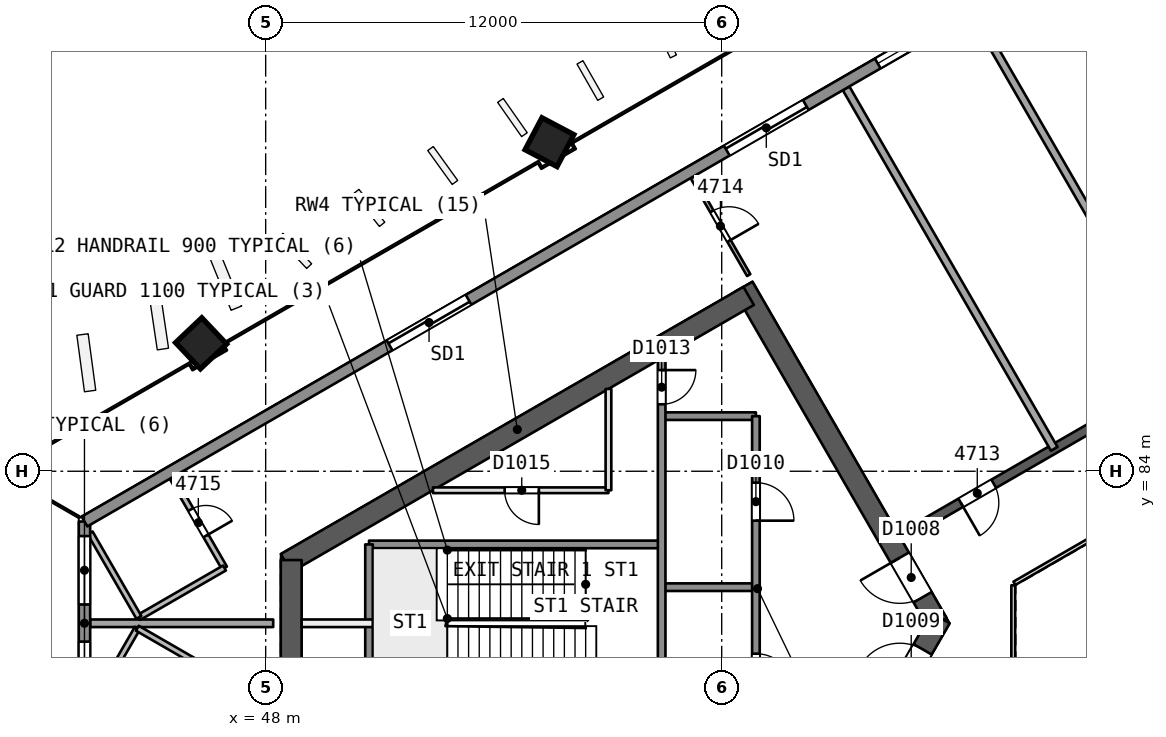
"""IFC4 building model, lengths in metres.
Left out: names, types, materials, properties, quantities, classifications, styles, units other than length and angle.
Written with IfcOpenShell. Run it as: python <this file> out.ifc"""

import sys

from ifc_helpers import new_model, si_unit, direction, frame, frame_2d, origin, origin_2d, place, context, subcontext, project, spatial, rectangle, extrude, element, fill, save


model = new_model("IFC4")
c1 = context("Model", 3, precision=1e-05, world=origin(), true_north=direction((0.0, 1.0)))
c2 = subcontext(c1, "Body", "Model", "MODEL_VIEW")
j1 = project(units=[si_unit("LENGTHUNIT", "METRE"), si_unit("PLANEANGLEUNIT", "RADIAN")], contexts=[c1])
p1 = place(None, origin())
s1 = spatial("IfcSite", under=j1, at=p1, CompositionType="ELEMENT")
p2 = place(p1, origin())
s2 = spatial("IfcBuilding", under=s1, at=p2, CompositionType="ELEMENT")
p3 = place(p2, frame((0.0, 0.0, 193.3)))
s3 = spatial("IfcBuildingStorey", under=s2, at=p3, CompositionType="ELEMENT", Elevation=193.3)
p4 = place(p3, frame((65.682, 80.0, 0.0), z_axis=(0.0, 0.0, 1.0), x_axis=(-0.500000202252, 0.866025287014, 0.0)))
e1 = element("IfcWall", 1, at=p4, inside=s3, PredefinedType="SHEAR", context=c2, shape_type="SweptSolid", body=[
    extrude(rectangle(XDim=10.221, YDim=0.55, at=frame_2d((5.111, 0.0))), origin(), (0.0, 0.0, 1.0), 3.7),
])
p5 = place(p4, frame((0.791, 0.0, 0.0)))
e2 = element("IfcOpeningElement", 2, at=p5, cuts=e1, PredefinedType="OPENING", context=c2, shape_type="SweptSolid", body=[
    extrude(rectangle(XDim=1.2, YDim=2.1, at=frame_2d((0.6, 1.05))), frame((0.0, 0.286, 0.0), z_axis=(0.0, -1.0, 0.0), x_axis=(1.0, 0.0, 0.0)), (0.0, 0.0, 1.0), 0.571),
])
p6 = place(p3, frame((60.709, 88.614, 0.0), z_axis=(0.0, 0.0, 1.0), x_axis=(-0.866020164116, -0.500009075263, 0.0)))
e3 = element("IfcWall", 3, at=p6, inside=s3, PredefinedType="SHEAR", context=c2, shape_type="SweptSolid", body=[
    extrude(rectangle(XDim=14.058, YDim=0.55, at=frame_2d((7.029, 0.0))), origin(), (0.0, 0.0, 1.0), 3.7),
])
p7 = place(p3, frame((48.672, 81.664, 0.0), z_axis=(0.0, 0.0, 1.0), x_axis=(0.0, -1.0, 0.0)))
e4 = element("IfcWall", 4, at=p7, inside=s3, PredefinedType="SHEAR", context=c2, shape_type="SweptSolid", body=[
    extrude(rectangle(XDim=3.487, YDim=0.55, at=frame_2d((1.743, 0.0))), origin(), (0.0, 0.0, 1.0), 3.7),
])
p8 = place(p3, frame((60.709, 71.386, 0.0), z_axis=(0.0, 0.0, 1.0), x_axis=(0.500015938302, 0.866016201606, 0.0)))
e5 = element("IfcWall", 5, at=p8, inside=s3, PredefinedType="SHEAR", context=c2, shape_type="SweptSolid", body=[
    extrude(rectangle(XDim=10.105, YDim=0.55, at=frame_2d((5.053, 0.0))), origin(), (0.0, 0.0, 1.0), 3.7),
])
p9 = place(p8, frame((7.955, 0.0, 0.0)))
e6 = element("IfcOpeningElement", 6, at=p9, cuts=e5, PredefinedType="OPENING", context=c2, shape_type="SweptSolid", body=[
    extrude(rectangle(XDim=1.2, YDim=2.1, at=frame_2d((0.6, 1.05))), frame((0.0, 0.286, 0.0), z_axis=(0.0, -1.0, 0.0), x_axis=(1.0, 0.0, 0.0)), (0.0, 0.0, 1.0), 0.571),
])
p10 = place(p3, frame((78.2, 90.046, 0.0), z_axis=(0.0, 0.0, 1.0), x_axis=(-0.866026492143, -0.499998114903, 0.0)))
e7 = element("IfcWall", 7, at=p10, inside=s3, PredefinedType="SHEAR", context=c2, shape_type="SweptSolid", body=[
    extrude(rectangle(XDim=15.588, YDim=0.25, at=frame_2d((7.794, 0.0))), origin(), (0.0, 0.0, 1.0), 3.3),
])
p11 = place(p10, frame((1.059, 0.0, 0.0)))
e8 = element("IfcOpeningElement", 8, at=p11, cuts=e7, PredefinedType="OPENING", context=c2, shape_type="SweptSolid", body=[
    extrude(rectangle(XDim=1.0, YDim=2.1, at=frame_2d((0.5, 1.05))), frame((0.0, 0.135, 0.0), z_axis=(0.0, -1.0, 0.0), x_axis=(1.0, 0.0, 0.0)), (0.0, 0.0, 1.0), 0.271),
])
p12 = place(p10, frame((4.616, 0.0, 0.0)))
e9 = element("IfcOpeningElement", 9, at=p12, cuts=e7, PredefinedType="OPENING", context=c2, shape_type="SweptSolid", body=[
    extrude(rectangle(XDim=0.9, YDim=2.1, at=frame_2d((0.45, 1.05))), frame((0.0, 0.135, 0.0), z_axis=(0.0, -1.0, 0.0), x_axis=(1.0, 0.0, 0.0)), (0.0, 0.0, 1.0), 0.271),
])
p13 = place(p10, frame((8.513, 0.0, 0.0)))
e10 = element("IfcOpeningElement", 10, at=p13, cuts=e7, PredefinedType="OPENING", context=c2, shape_type="SweptSolid", body=[
    extrude(rectangle(XDim=0.9, YDim=2.1, at=frame_2d((0.45, 1.05))), frame((0.0, 0.135, 0.0), z_axis=(0.0, -1.0, 0.0), x_axis=(1.0, 0.0, 0.0)), (0.0, 0.0, 1.0), 0.271),
])
p14 = place(p10, frame((12.75, 0.0, 0.0)))
e11 = element("IfcOpeningElement", 11, at=p14, cuts=e7, PredefinedType="OPENING", context=c2, shape_type="SweptSolid", body=[
    extrude(rectangle(XDim=1.0, YDim=2.1, at=frame_2d((0.5, 1.05))), frame((0.0, 0.135, 0.0), z_axis=(0.0, -1.0, 0.0), x_axis=(1.0, 0.0, 0.0)), (0.0, 0.0, 1.0), 0.271),
])
p15 = place(p3, frame((55.445, 92.674, 0.0), z_axis=(0.019328501455, -0.012204002625, 0.999738701537), x_axis=(-0.498096589224, 0.866885952098, 0.020212220507)))
e12 = element("IfcColumn", 12, at=p15, inside=s3, PredefinedType="COLUMN", context=c2, shape_type="SweptSolid", body=[
    extrude(rectangle(XDim=0.95, YDim=0.95, at=origin_2d()), origin(), (0.0, 0.0, 1.0), 3.701),
])
p16 = place(p3, frame((46.266, 87.374, 0.0), z_axis=(0.02855911485, -0.006793507689, 0.999569019734), x_axis=(-0.500407643461, 0.865554709988, 0.020180049142)))
e13 = element("IfcColumn", 13, at=p16, inside=s3, PredefinedType="COLUMN", context=c2, shape_type="SweptSolid", body=[
    extrude(rectangle(XDim=0.95, YDim=0.95, at=origin_2d()), origin(), (0.0, 0.0, 1.0), 3.702),
])
for number, where, z_axis, x_axis in (
    (14, (66.648, 96.025, 0.0), (0.0, 0.0, 1.0), (0.5, -0.866, 0.0)),
    (15, (63.273, 94.076, 0.0), (0.0, 0.0, 1.0), (0.5, -0.866, 0.0)),
):
    element("IfcWall", number, at=place(p3, frame(where, z_axis=z_axis, x_axis=x_axis)), inside=s3, PredefinedType="PARTITIONING", context=c2, shape_type="SweptSolid", body=[
        extrude(rectangle(XDim=10.954, YDim=0.2, at=frame_2d((5.477, 0.0))), origin(), (0.0, 0.0, 1.0), 3.3),
    ])
p17 = place(p3, frame((59.223, 91.738, 0.0), z_axis=(0.0, 0.0, 1.0), x_axis=(0.49997816789, -0.866038008192, 0.0)))
e16 = element("IfcWall", 16, at=p17, inside=s3, PredefinedType="PARTITIONING", context=c2, shape_type="SweptSolid", body=[
    extrude(rectangle(XDim=2.975, YDim=0.1, at=frame_2d((1.488, 0.0))), origin(), (0.0, 0.0, 1.0), 3.3),
])
p18 = place(p17, frame((1.038, 0.0, 0.0)))
e17 = element("IfcOpeningElement", 17, at=p18, cuts=e16, PredefinedType="OPENING", context=c2, shape_type="SweptSolid", body=[
    extrude(rectangle(XDim=0.9, YDim=2.1, at=frame_2d((0.45, 1.05))), frame((0.0, 0.061, 0.0), z_axis=(0.0, -1.0, 0.0), x_axis=(1.0, 0.0, 0.0)), (0.0, 0.0, 1.0), 0.121),
])
p19 = place(p3, frame((45.54, 83.838, 0.0), z_axis=(0.0, 0.0, 1.0), x_axis=(0.499983500429, -0.866034929606, 0.0)))
e18 = element("IfcWall", 18, at=p19, inside=s3, PredefinedType="PARTITIONING", context=c2, shape_type="SweptSolid", body=[
    extrude(rectangle(XDim=2.752, YDim=0.15, at=frame_2d((1.376, 0.0))), origin(), (0.0, 0.0, 1.0), 3.3),
])
p20 = place(p19, frame((0.976, 0.0, 0.0)))
e19 = element("IfcOpeningElement", 19, at=p20, cuts=e18, PredefinedType="OPENING", context=c2, shape_type="SweptSolid", body=[
    extrude(rectangle(XDim=0.8, YDim=2.1, at=frame_2d((0.4, 1.05))), frame((0.0, 0.085, 0.0), z_axis=(0.0, -1.0, 0.0), x_axis=(1.0, 0.0, 0.0)), (0.0, 0.0, 1.0), 0.171),
])
p21 = place(p3, frame((46.916, 81.454, 0.0), z_axis=(0.0, 0.0, 1.0), x_axis=(-0.866021400173, -0.500006934395, 0.0)))
e20 = element("IfcWall", 20, at=p21, inside=s3, PredefinedType="PARTITIONING", context=c2, shape_type="SweptSolid", body=[
    extrude(rectangle(XDim=2.6, YDim=0.15, at=frame_2d((1.3, 0.0))), origin(), (0.0, 0.0, 1.0), 3.3),
])
p22 = place(p3, frame((44.664, 80.154, 0.0), z_axis=(0.0, 0.0, 1.0), x_axis=(-0.49996389635, 0.866046247233, 0.0)))
e21 = element("IfcWall", 21, at=p22, inside=s3, PredefinedType="PARTITIONING", context=c2, shape_type="SweptSolid", body=[
    extrude(rectangle(XDim=2.568, YDim=0.15, at=frame_2d((1.284, 0.0))), origin(), (0.0, 0.0, 1.0), 3.3),
])
p23 = place(p3, frame((43.381, 80.0, 0.0), z_axis=(0.0, 0.0, 1.0), x_axis=(1.0, 0.0, 0.0)))
e22 = element("IfcWall", 22, at=p23, inside=s3, PredefinedType="PARTITIONING", context=c2, shape_type="SweptSolid", body=[
    extrude(rectangle(XDim=4.817, YDim=0.2, at=frame_2d((2.409, 0.0))), origin(), (0.0, 0.0, 1.0), 3.3),
])
p24 = place(p3, frame((43.381, 77.718, 0.0), z_axis=(0.0, 0.0, 1.0), x_axis=(0.499943602543, 0.866057962423, 0.0)))
e23 = element("IfcWall", 23, at=p24, inside=s3, PredefinedType="PARTITIONING", context=c2, shape_type="SweptSolid", body=[
    extrude(rectangle(XDim=2.485, YDim=0.15, at=frame_2d((1.242, 0.0))), origin(), (0.0, 0.0, 1.0), 3.3),
])
p25 = place(p3, frame((44.623, 79.87, 0.0), z_axis=(0.0, 0.0, 1.0), x_axis=(0.866021400173, -0.500006934395, 0.0)))
e24 = element("IfcWall", 24, at=p25, inside=s3, PredefinedType="PARTITIONING", context=c2, shape_type="SweptSolid", body=[
    extrude(rectangle(XDim=2.6, YDim=0.15, at=frame_2d((1.3, 0.0))), origin(), (0.0, 0.0, 1.0), 3.3),
])
p26 = place(p3, frame((43.232, 77.322, 0.0), z_axis=(0.0, 0.0, 1.0), x_axis=(0.0, 1.0, 0.0)))
e25 = element("IfcWall", 25, at=p26, inside=s3, PredefinedType="SOLIDWALL", context=c2, shape_type="SweptSolid", body=[
    extrude(rectangle(XDim=5.355, YDim=0.3, at=frame_2d((2.678, 0.0))), origin(), (0.0, 0.0, 1.0), 3.3),
])
p27 = place(p26, frame((3.172, 0.0, 0.9)))
e26 = element("IfcOpeningElement", 26, at=p27, cuts=e25, PredefinedType="OPENING", context=c2, shape_type="SweptSolid", body=[
    extrude(rectangle(XDim=1.8, YDim=1.5, at=frame_2d((0.9, 0.75))), frame((0.0, 0.161, 0.0), z_axis=(0.0, -1.0, 0.0), x_axis=(1.0, 0.0, 0.0)), (0.0, 0.0, 1.0), 0.321),
])
p28 = place(p26, frame((0.395, 0.0, 0.9)))
e27 = element("IfcOpeningElement", 27, at=p28, cuts=e25, PredefinedType="OPENING", context=c2, shape_type="SweptSolid", body=[
    extrude(rectangle(XDim=1.8, YDim=1.5, at=frame_2d((0.9, 0.75))), frame((0.0, 0.161, 0.0), z_axis=(0.0, -1.0, 0.0), x_axis=(1.0, 0.0, 0.0)), (0.0, 0.0, 1.0), 0.321),
])
p29 = place(p3, frame((43.232, 82.678, 0.0), z_axis=(0.0, 0.0, 1.0), x_axis=(0.866025125259, 0.500000482419, 0.0)))
e28 = element("IfcWall", 28, at=p29, inside=s3, PredefinedType="SOLIDWALL", context=c2, shape_type="SweptSolid", body=[
    extrude(rectangle(XDim=52.347, YDim=0.3, at=frame_2d((26.173, 0.0))), origin(), (0.0, 0.0, 1.0), 3.3),
])
p30 = place(p29, frame((31.209, 0.0, 0.0)))
e29 = element("IfcOpeningElement", 29, at=p30, cuts=e28, PredefinedType="OPENING", context=c2, shape_type="SweptSolid", body=[
    extrude(rectangle(XDim=2.4, YDim=2.4, at=frame_2d((1.2, 1.2))), frame((0.0, 0.161, 0.0), z_axis=(0.0, -1.0, 0.0), x_axis=(1.0, 0.0, 0.0)), (0.0, 0.0, 1.0), 0.321),
])
p31 = place(p29, frame((40.7, 0.0, 0.0)))
e30 = element("IfcOpeningElement", 30, at=p31, cuts=e28, PredefinedType="OPENING", context=c2, shape_type="SweptSolid", body=[
    extrude(rectangle(XDim=2.4, YDim=2.4, at=frame_2d((1.2, 1.2))), frame((0.0, 0.161, 0.0), z_axis=(0.0, -1.0, 0.0), x_axis=(1.0, 0.0, 0.0)), (0.0, 0.0, 1.0), 0.321),
])
p32 = place(p29, frame((19.517, 0.0, 0.0)))
e31 = element("IfcOpeningElement", 31, at=p32, cuts=e28, PredefinedType="OPENING", context=c2, shape_type="SweptSolid", body=[
    extrude(rectangle(XDim=2.4, YDim=2.4, at=frame_2d((1.2, 1.2))), frame((0.0, 0.161, 0.0), z_axis=(0.0, -1.0, 0.0), x_axis=(1.0, 0.0, 0.0)), (0.0, 0.0, 1.0), 0.321),
])
p33 = place(p29, frame((9.27, 0.0, 0.0)))
e32 = element("IfcOpeningElement", 32, at=p33, cuts=e28, PredefinedType="OPENING", context=c2, shape_type="SweptSolid", body=[
    extrude(rectangle(XDim=2.4, YDim=2.4, at=frame_2d((1.2, 1.2))), frame((0.0, 0.161, 0.0), z_axis=(0.0, -1.0, 0.0), x_axis=(1.0, 0.0, 0.0)), (0.0, 0.0, 1.0), 0.321),
])
p34 = place(p29, frame((28.001, 0.0, 0.9)))
e33 = element("IfcOpeningElement", 33, at=p34, cuts=e28, PredefinedType="OPENING", context=c2, shape_type="SweptSolid", body=[
    extrude(rectangle(XDim=1.8, YDim=1.5, at=frame_2d((0.9, 0.75))), frame((0.0, 0.161, 0.0), z_axis=(0.0, -1.0, 0.0), x_axis=(1.0, 0.0, 0.0)), (0.0, 0.0, 1.0), 0.321),
])
p35 = place(p29, frame((24.104, 0.0, 0.9)))
e34 = element("IfcOpeningElement", 34, at=p35, cuts=e28, PredefinedType="OPENING", context=c2, shape_type="SweptSolid", body=[
    extrude(rectangle(XDim=1.8, YDim=1.5, at=frame_2d((0.9, 0.75))), frame((0.0, 0.161, 0.0), z_axis=(0.0, -1.0, 0.0), x_axis=(1.0, 0.0, 0.0)), (0.0, 0.0, 1.0), 0.321),
])
p36 = place(p3, frame((60.9, 85.45, 0.0), z_axis=(0.0, 0.0, 1.0), x_axis=(-1.0, 0.0, 0.0)))
e35 = element("IfcWall", 35, at=p36, inside=s3, PredefinedType="SOLIDWALL", context=c2, shape_type="SweptSolid", body=[
    extrude(rectangle(XDim=2.48, YDim=0.2, at=frame_2d((1.24, 0.0))), origin(), (0.0, 0.0, 1.0), 3.3),
])
p37 = place(p3, frame((57.02, 83.5, 0.0), z_axis=(0.0, 0.0, 1.0), x_axis=(-1.0, 0.0, 0.0)))
e36 = element("IfcWall", 36, at=p37, inside=s3, PredefinedType="PARTITIONING", context=c2, shape_type="SweptSolid", body=[
    extrude(rectangle(XDim=4.618, YDim=0.15, at=frame_2d((2.309, 0.0))), origin(), (0.0, 0.0, 1.0), 3.3),
])
p38 = place(p37, frame((1.832, 0.0, 0.0)))
e37 = element("IfcOpeningElement", 37, at=p38, cuts=e36, PredefinedType="OPENING", context=c2, shape_type="SweptSolid", body=[
    extrude(rectangle(XDim=0.9, YDim=2.1, at=frame_2d((0.45, 1.05))), frame((0.0, 0.085, 0.0), z_axis=(0.0, -1.0, 0.0), x_axis=(1.0, 0.0, 0.0)), (0.0, 0.0, 1.0), 0.171),
])
p39 = place(p3, frame((58.42, 82.075, 0.0), z_axis=(0.0, 0.0, 1.0), x_axis=(-1.0, 0.0, 0.0)))
e38 = element("IfcWall", 38, at=p39, inside=s3, PredefinedType="SOLIDWALL", context=c2, shape_type="SweptSolid", body=[
    extrude(rectangle(XDim=7.7, YDim=0.2, at=frame_2d((3.85, 0.0))), origin(), (0.0, 0.0, 1.0), 3.3),
])
p40 = place(p3, frame((60.9, 80.95, 0.0), z_axis=(0.0, 0.0, 1.0), x_axis=(-1.0, 0.0, 0.0)))
e39 = element("IfcWall", 39, at=p40, inside=s3, PredefinedType="SOLIDWALL", context=c2, shape_type="SweptSolid", body=[
    extrude(rectangle(XDim=2.48, YDim=0.2, at=frame_2d((1.24, 0.0))), origin(), (0.0, 0.0, 1.0), 3.3),
])
p41 = place(p3, frame((50.82, 80.0, 0.0), z_axis=(0.0, 0.0, 1.0), x_axis=(-1.0, 0.0, 0.0)))
e40 = element("IfcWall", 40, at=p41, inside=s3, PredefinedType="PARTITIONING", context=c2, shape_type="SweptSolid", body=[
    extrude(rectangle(XDim=1.873, YDim=0.2, at=frame_2d((0.937, 0.0))), origin(), (0.0, 0.0, 1.0), 3.3),
])
p42 = place(p3, frame((60.9, 85.45, 0.0), z_axis=(0.0, 0.0, 1.0), x_axis=(0.0, -1.0, 0.0)))
e41 = element("IfcWall", 41, at=p42, inside=s3, PredefinedType="SOLIDWALL", context=c2, shape_type="SweptSolid", body=[
    extrude(rectangle(XDim=10.9, YDim=0.2, at=frame_2d((5.45, 0.0))), origin(), (0.0, 0.0, 1.0), 3.3),
])
p43 = place(p42, frame((1.75, 0.0, 0.0)))
e42 = element("IfcOpeningElement", 42, at=p43, cuts=e41, PredefinedType="OPENING", context=c2, shape_type="SweptSolid", body=[
    extrude(rectangle(XDim=1.0, YDim=2.1, at=frame_2d((0.5, 1.05))), frame((0.0, 0.11, 0.0), z_axis=(0.0, -1.0, 0.0), x_axis=(1.0, 0.0, 0.0)), (0.0, 0.0, 1.0), 0.221),
])
p44 = place(p42, frame((6.25, 0.0, 0.0)))
e43 = element("IfcOpeningElement", 43, at=p44, cuts=e41, PredefinedType="OPENING", context=c2, shape_type="SweptSolid", body=[
    extrude(rectangle(XDim=1.0, YDim=2.1, at=frame_2d((0.5, 1.05))), frame((0.0, 0.11, 0.0), z_axis=(0.0, -1.0, 0.0), x_axis=(1.0, 0.0, 0.0)), (0.0, 0.0, 1.0), 0.221),
])
p45 = place(p3, frame((58.42, 86.974, 0.0), z_axis=(0.0, 0.0, 1.0), x_axis=(0.0, -1.0, 0.0)))
e44 = element("IfcWall", 44, at=p45, inside=s3, PredefinedType="SOLIDWALL", context=c2, shape_type="SweptSolid", body=[
    extrude(rectangle(XDim=10.524, YDim=0.2, at=frame_2d((5.262, 0.0))), origin(), (0.0, 0.0, 1.0), 3.3),
])
p46 = place(p45, frame((0.312, 0.0, 0.0)))
e45 = element("IfcOpeningElement", 45, at=p46, cuts=e44, PredefinedType="OPENING", context=c2, shape_type="SweptSolid", body=[
    extrude(rectangle(XDim=0.9, YDim=2.1, at=frame_2d((0.45, 1.05))), frame((0.0, 0.11, 0.0), z_axis=(0.0, -1.0, 0.0), x_axis=(1.0, 0.0, 0.0)), (0.0, 0.0, 1.0), 0.221),
])
p47 = place(p3, frame((57.02, 86.166, 0.0), z_axis=(0.0, 0.0, 1.0), x_axis=(0.0, -1.0, 0.0)))
e46 = element("IfcWall", 46, at=p47, inside=s3, PredefinedType="PARTITIONING", context=c2, shape_type="SweptSolid", body=[
    extrude(rectangle(XDim=2.666, YDim=0.15, at=frame_2d((1.333, 0.0))), origin(), (0.0, 0.0, 1.0), 3.3),
])
p48 = place(p3, frame((50.72, 82.075, 0.0), z_axis=(0.0, 0.0, 1.0), x_axis=(0.0, -1.0, 0.0)))
e47 = element("IfcWall", 47, at=p48, inside=s3, PredefinedType="SOLIDWALL", context=c2, shape_type="SweptSolid", body=[
    extrude(rectangle(XDim=4.15, YDim=0.2, at=frame_2d((2.075, 0.0))), origin(), (0.0, 0.0, 1.0), 3.3),
])
p49 = place(p3, frame((77.738, 86.846, 0.0), z_axis=(0.0, 0.0, 1.0), x_axis=(-0.866026658274, -0.499997827154, 0.0)))
e48 = element("IfcWall", 48, at=p49, inside=s3, PredefinedType="PARTITIONING", context=c2, shape_type="SweptSolid", body=[
    extrude(rectangle(XDim=11.588, YDim=0.1, at=frame_2d((5.794, 0.0))), origin(), (0.0, 0.0, 1.0), 3.3),
])
p50 = place(p3, frame((67.672, 81.0, 0.0), z_axis=(0.0, 0.0, 1.0), x_axis=(0.0, -1.0, 0.0)))
e49 = element("IfcWall", 49, at=p50, inside=s3, PredefinedType="PARTITIONING", context=c2, shape_type="SweptSolid", body=[
    extrude(rectangle(XDim=2.0, YDim=0.1, at=frame_2d((1.0, 0.0))), origin(), (0.0, 0.0, 1.0), 3.3),
])
p51 = place(p14, origin())
e50 = element("IfcDoor", 50, at=p51, inside=s3, OperationType="SINGLE_SWING_RIGHT", PredefinedType="NOTDEFINED", context=c2, shape_type="SweptSolid", body=[
    extrude(rectangle(XDim=1.0, YDim=2.1, at=frame_2d((0.5, 1.05))), frame((0.0, 0.025, 0.0), z_axis=(0.0, -1.0, 0.0), x_axis=(1.0, 0.0, 0.0)), (0.0, 0.0, 1.0), 0.05),
])
fill(e11, e50)
p52 = place(p18, origin())
e51 = element("IfcDoor", 51, at=p52, inside=s3, OperationType="SINGLE_SWING_RIGHT", PredefinedType="NOTDEFINED", context=c2, shape_type="SweptSolid", body=[
    extrude(rectangle(XDim=0.9, YDim=2.1, at=frame_2d((0.45, 1.05))), frame((0.0, 0.025, 0.0), z_axis=(0.0, -1.0, 0.0), x_axis=(1.0, 0.0, 0.0)), (0.0, 0.0, 1.0), 0.05),
])
fill(e17, e51)
p53 = place(p20, origin())
e52 = element("IfcDoor", 52, at=p53, inside=s3, OperationType="SINGLE_SWING_RIGHT", PredefinedType="NOTDEFINED", context=c2, shape_type="SweptSolid", body=[
    extrude(rectangle(XDim=0.8, YDim=2.1, at=frame_2d((0.4, 1.05))), frame((0.0, 0.025, 0.0), z_axis=(0.0, -1.0, 0.0), x_axis=(1.0, 0.0, 0.0)), (0.0, 0.0, 1.0), 0.05),
])
fill(e19, e52)
p54 = place(p27, origin())
e53 = element("IfcWindow", 53, at=p54, inside=s3, PartitioningType="SINGLE_PANEL", PredefinedType="WINDOW", context=c2, shape_type="SweptSolid", body=[
    extrude(rectangle(XDim=1.8, YDim=1.5, at=frame_2d((0.9, 0.75))), frame((0.0, 0.03, 0.0), z_axis=(0.0, -1.0, 0.0), x_axis=(1.0, 0.0, 0.0)), (0.0, 0.0, 1.0), 0.06),
])
fill(e26, e53)
p55 = place(p28, origin())
e54 = element("IfcWindow", 54, at=p55, inside=s3, PartitioningType="SINGLE_PANEL", PredefinedType="WINDOW", context=c2, shape_type="SweptSolid", body=[
    extrude(rectangle(XDim=1.8, YDim=1.5, at=frame_2d((0.9, 0.75))), frame((0.0, 0.03, 0.0), z_axis=(0.0, -1.0, 0.0), x_axis=(1.0, 0.0, 0.0)), (0.0, 0.0, 1.0), 0.06),
])
fill(e27, e54)
p56 = place(p32, origin())
e55 = element("IfcDoor", 55, at=p56, inside=s3, OperationType="SLIDING_TO_LEFT", PredefinedType="NOTDEFINED", context=c2, shape_type="SweptSolid", body=[
    extrude(rectangle(XDim=2.4, YDim=2.4, at=frame_2d((1.2, 1.2))), frame((0.0, 0.025, 0.0), z_axis=(0.0, -1.0, 0.0), x_axis=(1.0, 0.0, 0.0)), (0.0, 0.0, 1.0), 0.05),
])
fill(e31, e55)
p57 = place(p33, origin())
e56 = element("IfcDoor", 56, at=p57, inside=s3, OperationType="SLIDING_TO_RIGHT", PredefinedType="NOTDEFINED", context=c2, shape_type="SweptSolid", body=[
    extrude(rectangle(XDim=2.4, YDim=2.4, at=frame_2d((1.2, 1.2))), frame((0.0, 0.025, 0.0), z_axis=(0.0, -1.0, 0.0), x_axis=(1.0, 0.0, 0.0)), (0.0, 0.0, 1.0), 0.05),
])
fill(e32, e56)
p58 = place(p35, origin())
e57 = element("IfcWindow", 57, at=p58, inside=s3, PartitioningType="SINGLE_PANEL", PredefinedType="WINDOW", context=c2, shape_type="SweptSolid", body=[
    extrude(rectangle(XDim=1.8, YDim=1.5, at=frame_2d((0.9, 0.75))), frame((0.0, 0.03, 0.0), z_axis=(0.0, -1.0, 0.0), x_axis=(1.0, 0.0, 0.0)), (0.0, 0.0, 1.0), 0.06),
])
fill(e34, e57)
p59 = place(p5, origin())
e58 = element("IfcDoor", 58, at=p59, inside=s3, OperationType="SINGLE_SWING_RIGHT", PredefinedType="NOTDEFINED", context=c2, shape_type="SweptSolid", body=[
    extrude(rectangle(XDim=1.2, YDim=2.1, at=frame_2d((0.6, 1.05))), frame((0.0, 0.025, 0.0), z_axis=(0.0, -1.0, 0.0), x_axis=(1.0, 0.0, 0.0)), (0.0, 0.0, 1.0), 0.05),
])
fill(e2, e58)
p60 = place(p9, origin())
e59 = element("IfcDoor", 59, at=p60, inside=s3, OperationType="SINGLE_SWING_LEFT", PredefinedType="NOTDEFINED", context=c2, shape_type="SweptSolid", body=[
    extrude(rectangle(XDim=1.2, YDim=2.1, at=frame_2d((0.6, 1.05))), frame((0.0, 0.025, 0.0), z_axis=(0.0, -1.0, 0.0), x_axis=(1.0, 0.0, 0.0)), (0.0, 0.0, 1.0), 0.05),
])
fill(e6, e59)
p61 = place(p43, origin())
e60 = element("IfcDoor", 60, at=p61, inside=s3, OperationType="SINGLE_SWING_RIGHT", PredefinedType="NOTDEFINED", context=c2, shape_type="SweptSolid", body=[
    extrude(rectangle(XDim=1.0, YDim=2.1, at=frame_2d((0.5, 1.05))), frame((0.0, 0.025, 0.0), z_axis=(0.0, -1.0, 0.0), x_axis=(1.0, 0.0, 0.0)), (0.0, 0.0, 1.0), 0.05),
])
fill(e42, e60)
p62 = place(p44, origin())
e61 = element("IfcDoor", 61, at=p62, inside=s3, OperationType="SINGLE_SWING_RIGHT", PredefinedType="NOTDEFINED", context=c2, shape_type="SweptSolid", body=[
    extrude(rectangle(XDim=1.0, YDim=2.1, at=frame_2d((0.5, 1.05))), frame((0.0, 0.025, 0.0), z_axis=(0.0, -1.0, 0.0), x_axis=(1.0, 0.0, 0.0)), (0.0, 0.0, 1.0), 0.05),
])
fill(e43, e61)
p63 = place(p46, origin())
e62 = element("IfcDoor", 62, at=p63, inside=s3, OperationType="SINGLE_SWING_LEFT", PredefinedType="NOTDEFINED", context=c2, shape_type="SweptSolid", body=[
    extrude(rectangle(XDim=0.9, YDim=2.1, at=frame_2d((0.45, 1.05))), frame((0.0, 0.025, 0.0), z_axis=(0.0, -1.0, 0.0), x_axis=(1.0, 0.0, 0.0)), (0.0, 0.0, 1.0), 0.05),
])
fill(e45, e62)
p64 = place(p38, origin())
e63 = element("IfcDoor", 63, at=p64, inside=s3, OperationType="SINGLE_SWING_LEFT", PredefinedType="NOTDEFINED", context=c2, shape_type="SweptSolid", body=[
    extrude(rectangle(XDim=0.9, YDim=2.1, at=frame_2d((0.45, 1.05))), frame((0.0, 0.025, 0.0), z_axis=(0.0, -1.0, 0.0), x_axis=(1.0, 0.0, 0.0)), (0.0, 0.0, 1.0), 0.05),
])
fill(e37, e63)
save(model, sys.argv[1])
